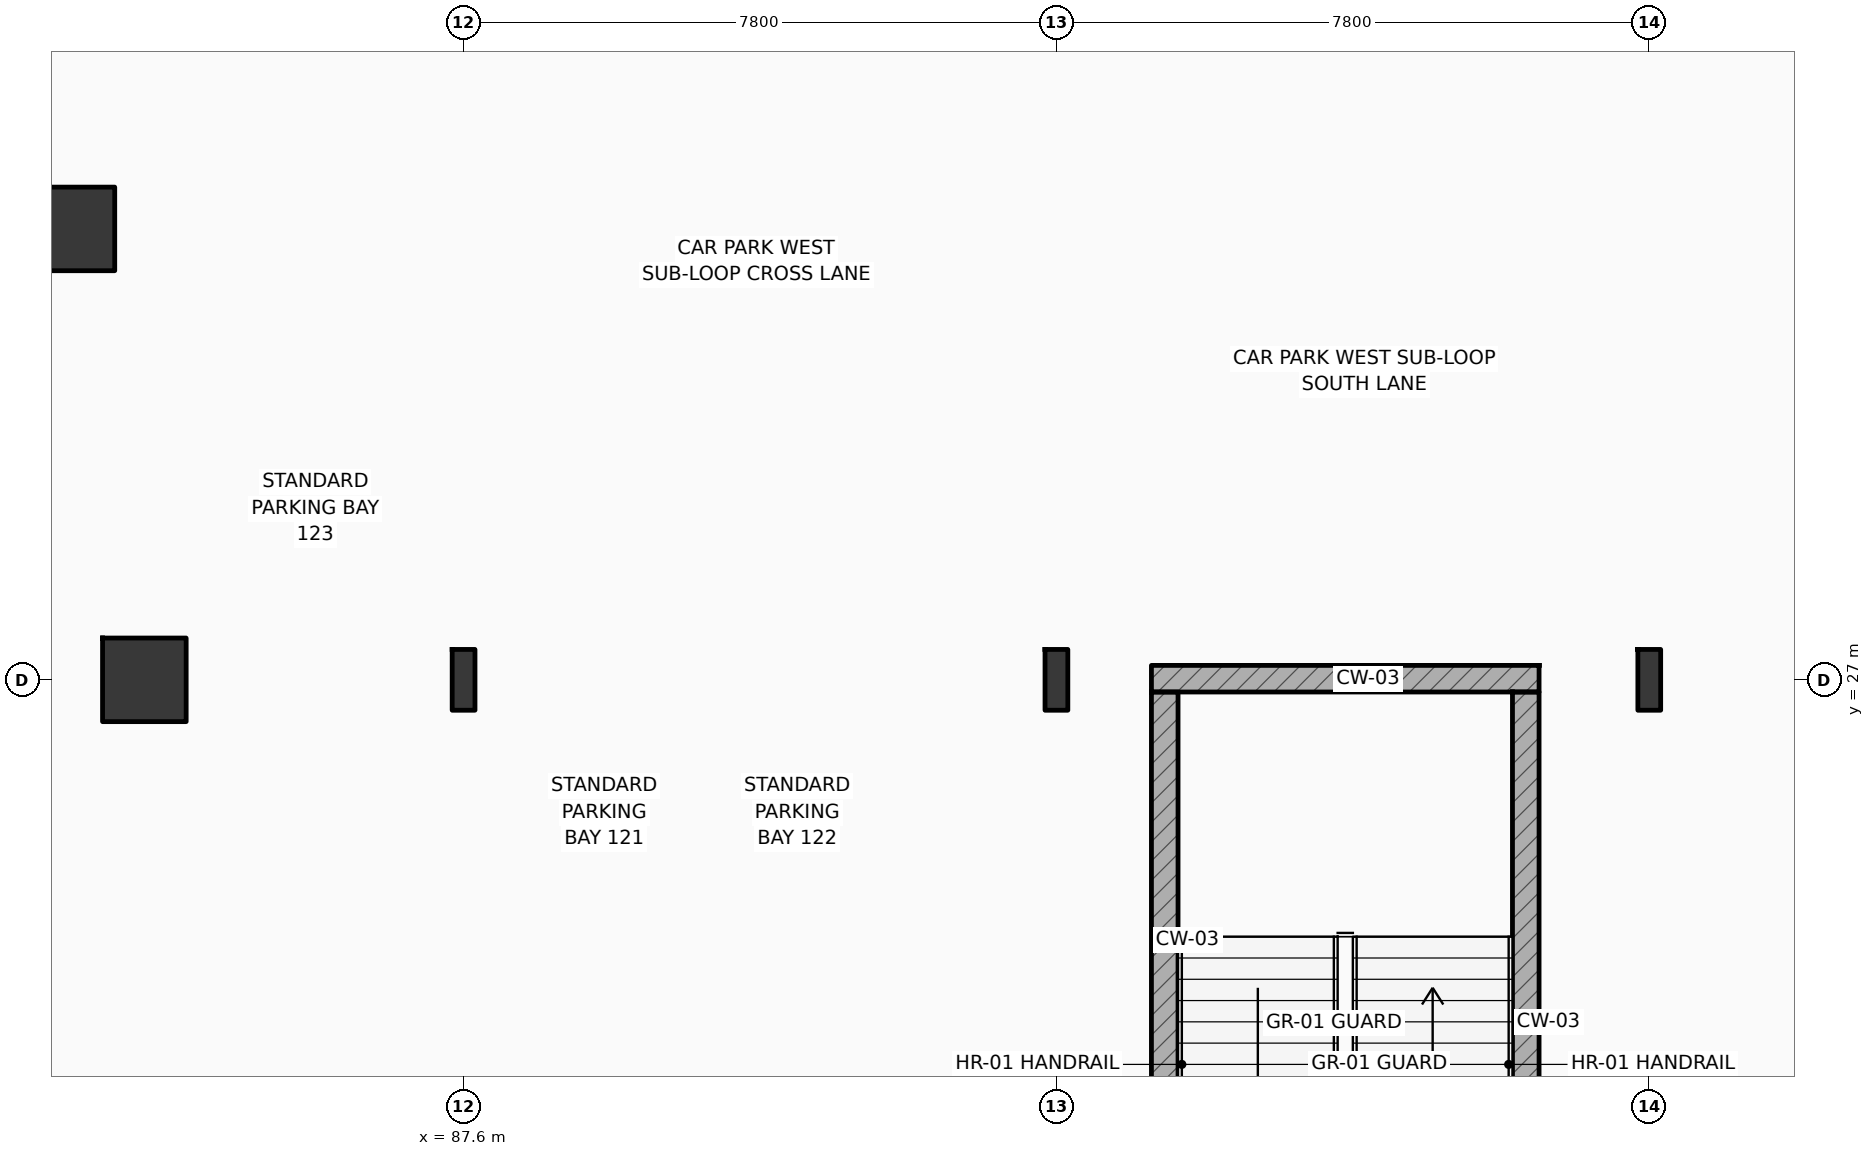
"""IFC4 building model, lengths in metres.
Left out: names, types, materials, properties, quantities, classifications, styles, units other than length and angle.
Written with IfcOpenShell. Run it as: python <this file> out.ifc"""

import sys

from ifc_helpers import new_model, si_unit, direction, frame, frame_2d, origin, origin_2d, place, context, subcontext, project, spatial, rectangle, i_section, extrude, element, save


model = new_model("IFC4")
c1 = context("Model", 3, precision=1e-05, world=origin(), true_north=direction((0.0, 1.0)))
c2 = subcontext(c1, "Body", "Model", "MODEL_VIEW")
j1 = project(units=[si_unit("LENGTHUNIT", "METRE"), si_unit("PLANEANGLEUNIT", "RADIAN")], contexts=[c1])
p1 = place(None, origin())
s1 = spatial("IfcSite", under=j1, at=p1, CompositionType="ELEMENT")
p2 = place(p1, origin())
s2 = spatial("IfcBuilding", under=s1, at=p2, CompositionType="ELEMENT")
p3 = place(p2, frame((0.0, 0.0, -4.5)))
s3 = spatial("IfcBuildingStorey", under=s2, at=p3, CompositionType="ELEMENT", Elevation=-4.5)
for number, where, z_axis, x_axis in (
    (1, (87.6, 27.0, 0.0), (0.0, 0.0, 1.0), (1.0, 0.0, 0.0)),
    (2, (95.4, 27.0, 0.0), (0.0, 0.0, 1.0), (1.0, 0.0, 0.0)),
    (3, (103.2, 27.0, 0.0), (0.0, 0.0, 1.0), (1.0, 0.0, 0.0)),
):
    element("IfcColumn", number, at=place(p3, frame(where, z_axis=z_axis, x_axis=x_axis)), inside=s3, PredefinedType="COLUMN", context=c2, shape_type="SweptSolid", body=[
        extrude(i_section(OverallWidth=0.3, OverallDepth=0.8, WebThickness=0.018, FlangeThickness=0.033, FilletRadius=0.03, at=origin_2d()), origin(), (0.0, 0.0, 1.0), 4.5),
    ])
for number, where, z_axis, x_axis in (
    (4, (83.4, 27.0, 0.0), (0.0, 0.0, 1.0), (1.0, 0.0, 0.0)),
    (5, (82.46, 32.933, 0.0), (0.0, 0.0, 1.0), (1.0, 0.0, 0.0)),
):
    element("IfcColumn", number, at=place(p3, frame(where, z_axis=z_axis, x_axis=x_axis)), inside=s3, PredefinedType="COLUMN", context=c2, shape_type="SweptSolid", body=[
        extrude(rectangle(XDim=1.1, YDim=1.1, at=origin_2d()), origin(), (0.0, 0.0, 1.0), 4.5),
    ])
p4 = place(p3, frame((96.65, 27.015, 0.0), z_axis=(0.0, 0.0, 1.0), x_axis=(1.0, 0.0, 0.0)))
e6 = element("IfcWall", 6, at=p4, inside=s3, PredefinedType="SHEAR", context=c2, shape_type="SweptSolid", body=[
    extrude(rectangle(XDim=5.1, YDim=0.35, at=frame_2d((2.55, 0.0))), origin(), (0.0, 0.0, 1.0), 4.5),
])
p5 = place(p3, frame((96.825, 18.16, 0.0), z_axis=(0.0, 0.0, 1.0), x_axis=(0.0, 1.0, 0.0)))
e7 = element("IfcWall", 7, at=p5, inside=s3, PredefinedType="SHEAR", context=c2, shape_type="SweptSolid", body=[
    extrude(rectangle(XDim=8.68, YDim=0.35, at=frame_2d((4.34, 0.0))), origin(), (0.0, 0.0, 1.0), 4.5),
])
p6 = place(p5, frame((0.25, 0.0, 0.0)))
e8 = element("IfcOpeningElement", 8, at=p6, cuts=e7, PredefinedType="OPENING", context=c2, shape_type="SweptSolid", body=[
    extrude(rectangle(XDim=1.6, YDim=2.2, at=frame_2d((0.8, 1.1))), frame((0.0, 0.185, 0.0), z_axis=(0.0, -1.0, 0.0), x_axis=(1.0, 0.0, 0.0)), (0.0, 0.0, 1.0), 0.37),
])
p7 = place(p3, frame((101.575, 18.16, 0.0), z_axis=(0.0, 0.0, 1.0), x_axis=(0.0, 1.0, 0.0)))
e9 = element("IfcWall", 9, at=p7, inside=s3, PredefinedType="SHEAR", context=c2, shape_type="SweptSolid", body=[
    extrude(rectangle(XDim=8.68, YDim=0.35, at=frame_2d((4.34, 0.0))), origin(), (0.0, 0.0, 1.0), 4.5),
])
save(model, sys.argv[1])
